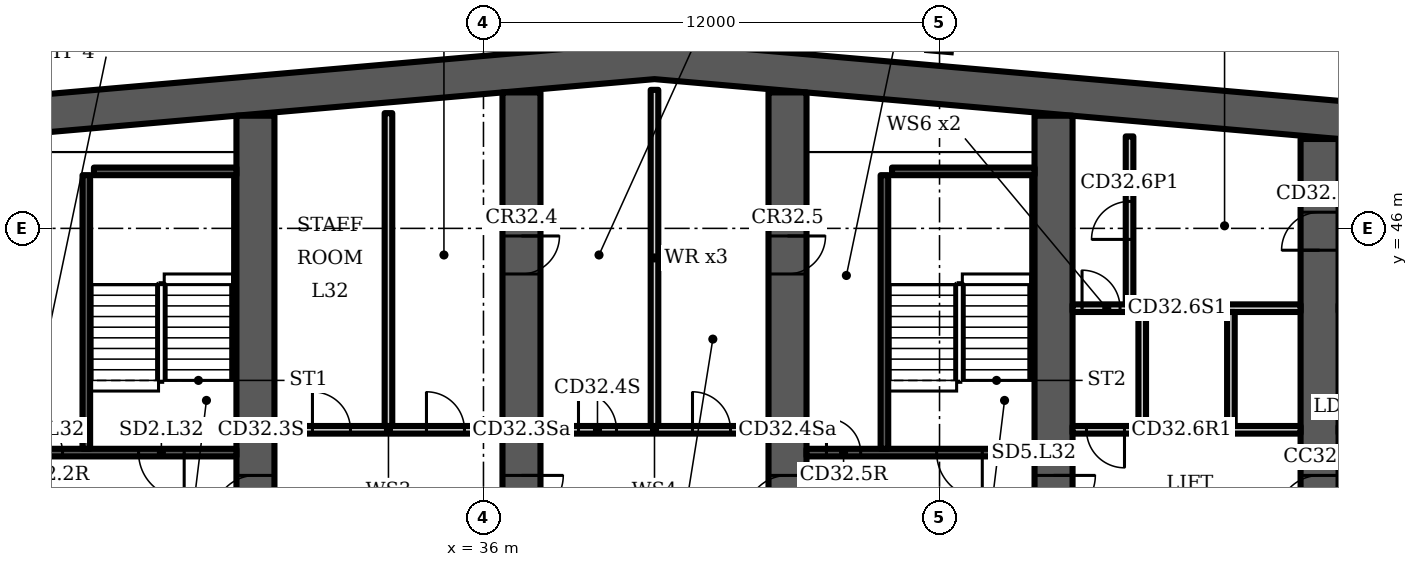
"""IFC4 building model, lengths in metres.
Left out: names, types, materials, properties, quantities, classifications, styles, units other than length and angle.
Written with IfcOpenShell. Run it as: python <this file> out.ifc"""

import sys

from ifc_helpers import new_model, si_unit, direction, frame, frame_2d, origin, origin_2d, place, context, subcontext, project, spatial, polyline, rectangle, i_section, outline, extrude, element, fill, save


model = new_model("IFC4")
c1 = context("Model", 3, precision=1e-05, world=origin(), true_north=direction((0.0, 1.0)))
c2 = subcontext(c1, "Body", "Model", "MODEL_VIEW")
j1 = project(units=[si_unit("LENGTHUNIT", "METRE"), si_unit("PLANEANGLEUNIT", "RADIAN")], contexts=[c1])
p1 = place(None, origin())
s1 = spatial("IfcSite", under=j1, at=p1, CompositionType="ELEMENT")
p2 = place(p1, origin())
s2 = spatial("IfcBuilding", under=s1, at=p2, CompositionType="ELEMENT")
p3 = place(p2, frame((0.0, 0.0, 136.3)))
s3 = spatial("IfcBuildingStorey", under=s2, at=p3, CompositionType="ELEMENT", Elevation=136.3)
p4 = place(p3, frame((0.0, 0.0, -0.0)))
e1 = element("IfcWall", 1, at=p4, inside=s3, PredefinedType="SHEAR", context=c2, shape_type="SweptSolid", body=[
    extrude(outline(polyline([(16.0, 47.784), (40.5, 49.927), (65.0, 47.784), (65.0, 48.787), (40.5, 50.931), (16.0, 48.787), (16.0, 47.784)])), origin(), (0.0, 0.0, 1.0), 3.6),
])
p5 = place(p3, frame((30.0, 35.0, 0.0), z_axis=(0.0, 0.0, 1.0), x_axis=(0.0, 1.0, 0.0)))
e2 = element("IfcWall", 2, at=p5, inside=s3, PredefinedType="SHEAR", context=c2, shape_type="SweptSolid", body=[
    extrude(rectangle(XDim=13.965, YDim=1.0, at=frame_2d((6.982, 0.0))), origin(), (0.0, 0.0, 1.0), 3.6),
])
p6 = place(p5, frame((3.4, 0.0, 0.0)))
e3 = element("IfcOpeningElement", 3, at=p6, cuts=e2, PredefinedType="OPENING", context=c2, shape_type="SweptSolid", body=[
    extrude(rectangle(XDim=1.1, YDim=2.1, at=frame_2d((0.55, 1.05))), frame((0.0, 0.51, 0.0), z_axis=(0.0, -1.0, 0.0), x_axis=(1.0, 0.0, 0.0)), (0.0, 0.0, 1.0), 1.02),
])
p7 = place(p3, frame((37.0, 35.0, 0.0), z_axis=(0.0, 0.0, 1.0), x_axis=(0.0, 1.0, 0.0)))
e4 = element("IfcWall", 4, at=p7, inside=s3, PredefinedType="SHEAR", context=c2, shape_type="SweptSolid", body=[
    extrude(rectangle(XDim=14.577, YDim=1.0, at=frame_2d((7.289, 0.0))), origin(), (0.0, 0.0, 1.0), 3.6),
])
p8 = place(p7, frame((3.4, 0.0, 0.0)))
e5 = element("IfcOpeningElement", 5, at=p8, cuts=e4, PredefinedType="OPENING", context=c2, shape_type="SweptSolid", body=[
    extrude(rectangle(XDim=1.1, YDim=2.1, at=frame_2d((0.55, 1.05))), frame((0.0, 0.51, 0.0), z_axis=(0.0, -1.0, 0.0), x_axis=(1.0, 0.0, 0.0)), (0.0, 0.0, 1.0), 1.02),
])
p9 = place(p7, frame((9.8, 0.0, 0.0)))
e6 = element("IfcOpeningElement", 6, at=p9, cuts=e4, PredefinedType="OPENING", context=c2, shape_type="SweptSolid", body=[
    extrude(rectangle(XDim=1.0, YDim=2.1, at=frame_2d((0.5, 1.05))), frame((0.0, 0.51, 0.0), z_axis=(0.0, -1.0, 0.0), x_axis=(1.0, 0.0, 0.0)), (0.0, 0.0, 1.0), 1.02),
])
p10 = place(p3, frame((44.0, 35.0, 0.0), z_axis=(0.0, 0.0, 1.0), x_axis=(0.0, 1.0, 0.0)))
e7 = element("IfcWall", 7, at=p10, inside=s3, PredefinedType="SHEAR", context=c2, shape_type="SweptSolid", body=[
    extrude(rectangle(XDim=14.577, YDim=1.0, at=frame_2d((7.289, 0.0))), origin(), (0.0, 0.0, 1.0), 3.6),
])
p11 = place(p10, frame((3.4, 0.0, 0.0)))
e8 = element("IfcOpeningElement", 8, at=p11, cuts=e7, PredefinedType="OPENING", context=c2, shape_type="SweptSolid", body=[
    extrude(rectangle(XDim=1.1, YDim=2.1, at=frame_2d((0.55, 1.05))), frame((0.0, 0.51, 0.0), z_axis=(0.0, -1.0, 0.0), x_axis=(1.0, 0.0, 0.0)), (0.0, 0.0, 1.0), 1.02),
])
p12 = place(p10, frame((9.8, 0.0, 0.0)))
e9 = element("IfcOpeningElement", 9, at=p12, cuts=e7, PredefinedType="OPENING", context=c2, shape_type="SweptSolid", body=[
    extrude(rectangle(XDim=1.0, YDim=2.1, at=frame_2d((0.5, 1.05))), frame((0.0, 0.51, 0.0), z_axis=(0.0, -1.0, 0.0), x_axis=(1.0, 0.0, 0.0)), (0.0, 0.0, 1.0), 1.02),
])
p13 = place(p3, frame((51.0, 35.0, 0.0), z_axis=(0.0, 0.0, 1.0), x_axis=(0.0, 1.0, 0.0)))
e10 = element("IfcWall", 10, at=p13, inside=s3, PredefinedType="SHEAR", context=c2, shape_type="SweptSolid", body=[
    extrude(rectangle(XDim=13.965, YDim=1.0, at=frame_2d((6.982, 0.0))), origin(), (0.0, 0.0, 1.0), 3.6),
])
p14 = place(p13, frame((3.4, 0.0, 0.0)))
e11 = element("IfcOpeningElement", 11, at=p14, cuts=e10, PredefinedType="OPENING", context=c2, shape_type="SweptSolid", body=[
    extrude(rectangle(XDim=1.1, YDim=2.1, at=frame_2d((0.55, 1.05))), frame((0.0, 0.51, 0.0), z_axis=(0.0, -1.0, 0.0), x_axis=(1.0, 0.0, 0.0)), (0.0, 0.0, 1.0), 1.02),
])
p15 = place(p3, frame((58.0, 35.0, 0.0), z_axis=(0.0, 0.0, 1.0), x_axis=(0.0, 1.0, 0.0)))
e12 = element("IfcWall", 12, at=p15, inside=s3, PredefinedType="SHEAR", context=c2, shape_type="SweptSolid", body=[
    extrude(rectangle(XDim=13.352, YDim=1.0, at=frame_2d((6.676, 0.0))), origin(), (0.0, 0.0, 1.0), 3.6),
])
p16 = place(p15, frame((10.426, 0.0, 0.0)))
e13 = element("IfcOpeningElement", 13, at=p16, cuts=e12, PredefinedType="OPENING", context=c2, shape_type="SweptSolid", body=[
    extrude(rectangle(XDim=1.0, YDim=2.1, at=frame_2d((0.5, 1.05))), frame((0.0, 0.51, 0.0), z_axis=(0.0, -1.0, 0.0), x_axis=(1.0, 0.0, 0.0)), (0.0, 0.0, 1.0), 1.02),
])
p17 = place(p15, frame((3.4, 0.0, 0.0)))
e14 = element("IfcOpeningElement", 14, at=p17, cuts=e12, PredefinedType="OPENING", context=c2, shape_type="SweptSolid", body=[
    extrude(rectangle(XDim=1.1, YDim=2.1, at=frame_2d((0.55, 1.05))), frame((0.0, 0.51, 0.0), z_axis=(0.0, -1.0, 0.0), x_axis=(1.0, 0.0, 0.0)), (0.0, 0.0, 1.0), 1.02),
])
p18 = place(p3, frame((48.0, 50.815, 0.0), z_axis=(0.0, 0.0, 1.0), x_axis=(0.087156, 0.996198, 0.0)))
e15 = element("IfcColumn", 15, at=p18, inside=s3, PredefinedType="COLUMN", context=c2, shape_type="SweptSolid", body=[
    extrude(i_section(OverallWidth=0.305, OverallDepth=0.62, WebThickness=0.021, FlangeThickness=0.04, FilletRadius=0.027, at=origin_2d()), origin(), (0.0, 0.0, 1.0), 3.6),
])
p19 = place(p3, frame((23.5, 40.1, 0.0), z_axis=(0.0, 0.0, 1.0), x_axis=(1.0, 0.0, 0.0)))
e16 = element("IfcWall", 16, at=p19, inside=s3, PredefinedType="SHEAR", context=c2, shape_type="SweptSolid", body=[
    extrude(rectangle(XDim=6.0, YDim=0.2, at=frame_2d((3.0, 0.0))), origin(), (0.0, 0.0, 1.0), 3.2),
])
p20 = place(p19, frame((3.425, 0.0, 0.0)))
e17 = element("IfcOpeningElement", 17, at=p20, cuts=e16, PredefinedType="OPENING", context=c2, shape_type="SweptSolid", body=[
    extrude(rectangle(XDim=1.2, YDim=2.1, at=frame_2d((0.6, 1.05))), frame((0.0, 0.11, 0.0), z_axis=(0.0, -1.0, 0.0), x_axis=(1.0, 0.0, 0.0)), (0.0, 0.0, 1.0), 0.22),
])
p21 = place(p19, frame((0.525, 0.0, 0.0)))
e18 = element("IfcOpeningElement", 18, at=p21, cuts=e16, PredefinedType="OPENING", context=c2, shape_type="SweptSolid", body=[
    extrude(rectangle(XDim=0.9, YDim=2.1, at=frame_2d((0.45, 1.05))), frame((0.0, 0.11, 0.0), z_axis=(0.0, -1.0, 0.0), x_axis=(1.0, 0.0, 0.0)), (0.0, 0.0, 1.0), 0.22),
])
p22 = place(p3, frame((25.55, 40.2, 0.0), z_axis=(0.0, 0.0, 1.0), x_axis=(0.0, 1.0, 0.0)))
e19 = element("IfcWall", 19, at=p22, inside=s3, PredefinedType="SHEAR", context=c2, shape_type="SweptSolid", body=[
    extrude(rectangle(XDim=7.2, YDim=0.2, at=frame_2d((3.6, 0.0))), origin(), (0.0, 0.0, 1.0), 3.2),
])
p23 = place(p3, frame((25.75, 47.5, 0.0), z_axis=(0.0, 0.0, 1.0), x_axis=(1.0, 0.0, 0.0)))
e20 = element("IfcWall", 20, at=p23, inside=s3, PredefinedType="SHEAR", context=c2, shape_type="SweptSolid", body=[
    extrude(rectangle(XDim=3.75, YDim=0.2, at=frame_2d((1.875, 0.0))), origin(), (0.0, 0.0, 1.0), 3.2),
])
p24 = place(p3, frame((30.5, 40.7, 0.0), z_axis=(0.0, 0.0, 1.0), x_axis=(1.0, 0.0, 0.0)))
e21 = element("IfcWall", 21, at=p24, inside=s3, PredefinedType="PARTITIONING", context=c2, shape_type="SweptSolid", body=[
    extrude(rectangle(XDim=6.0, YDim=0.2, at=frame_2d((3.0, 0.0))), origin(), (0.0, 0.0, 1.0), 3.2),
])
p25 = place(p24, frame((1.0, 0.0, 0.0)))
e22 = element("IfcOpeningElement", 22, at=p25, cuts=e21, PredefinedType="OPENING", context=c2, shape_type="SweptSolid", body=[
    extrude(rectangle(XDim=1.0, YDim=2.1, at=frame_2d((0.5, 1.05))), frame((0.0, 0.11, 0.0), z_axis=(0.0, -1.0, 0.0), x_axis=(1.0, 0.0, 0.0)), (0.0, 0.0, 1.0), 0.22),
])
p26 = place(p24, frame((4.0, 0.0, 0.0)))
e23 = element("IfcOpeningElement", 23, at=p26, cuts=e21, PredefinedType="OPENING", context=c2, shape_type="SweptSolid", body=[
    extrude(rectangle(XDim=1.0, YDim=2.1, at=frame_2d((0.5, 1.05))), frame((0.0, 0.11, 0.0), z_axis=(0.0, -1.0, 0.0), x_axis=(1.0, 0.0, 0.0)), (0.0, 0.0, 1.0), 0.22),
])
p27 = place(p3, frame((33.5, 40.8, 0.0), z_axis=(0.0, 0.0, 1.0), x_axis=(0.0, 1.0, 0.0)))
e24 = element("IfcWall", 24, at=p27, inside=s3, PredefinedType="PARTITIONING", context=c2, shape_type="SweptSolid", body=[
    extrude(rectangle(XDim=8.232, YDim=0.2, at=frame_2d((4.116, 0.0))), origin(), (0.0, 0.0, 1.0), 3.2),
])
p28 = place(p3, frame((37.5, 40.7, 0.0), z_axis=(0.0, 0.0, 1.0), x_axis=(1.0, 0.0, 0.0)))
e25 = element("IfcWall", 25, at=p28, inside=s3, PredefinedType="PARTITIONING", context=c2, shape_type="SweptSolid", body=[
    extrude(rectangle(XDim=6.0, YDim=0.2, at=frame_2d((3.0, 0.0))), origin(), (0.0, 0.0, 1.0), 3.2),
])
p29 = place(p28, frame((1.0, 0.0, 0.0)))
e26 = element("IfcOpeningElement", 26, at=p29, cuts=e25, PredefinedType="OPENING", context=c2, shape_type="SweptSolid", body=[
    extrude(rectangle(XDim=1.0, YDim=2.1, at=frame_2d((0.5, 1.05))), frame((0.0, 0.11, 0.0), z_axis=(0.0, -1.0, 0.0), x_axis=(1.0, 0.0, 0.0)), (0.0, 0.0, 1.0), 0.22),
])
p30 = place(p28, frame((4.0, 0.0, 0.0)))
e27 = element("IfcOpeningElement", 27, at=p30, cuts=e25, PredefinedType="OPENING", context=c2, shape_type="SweptSolid", body=[
    extrude(rectangle(XDim=1.0, YDim=2.1, at=frame_2d((0.5, 1.05))), frame((0.0, 0.11, 0.0), z_axis=(0.0, -1.0, 0.0), x_axis=(1.0, 0.0, 0.0)), (0.0, 0.0, 1.0), 0.22),
])
p31 = place(p3, frame((40.5, 40.8, 0.0), z_axis=(0.0, 0.0, 1.0), x_axis=(0.0, 1.0, 0.0)))
e28 = element("IfcWall", 28, at=p31, inside=s3, PredefinedType="PARTITIONING", context=c2, shape_type="SweptSolid", body=[
    extrude(rectangle(XDim=8.844, YDim=0.2, at=frame_2d((4.422, 0.0))), origin(), (0.0, 0.0, 1.0), 3.2),
])
p32 = place(p3, frame((44.5, 40.1, 0.0), z_axis=(0.0, 0.0, 1.0), x_axis=(1.0, 0.0, 0.0)))
e29 = element("IfcWall", 29, at=p32, inside=s3, PredefinedType="SHEAR", context=c2, shape_type="SweptSolid", body=[
    extrude(rectangle(XDim=6.0, YDim=0.2, at=frame_2d((3.0, 0.0))), origin(), (0.0, 0.0, 1.0), 3.2),
])
p33 = place(p32, frame((3.425, 0.0, 0.0)))
e30 = element("IfcOpeningElement", 30, at=p33, cuts=e29, PredefinedType="OPENING", context=c2, shape_type="SweptSolid", body=[
    extrude(rectangle(XDim=1.2, YDim=2.1, at=frame_2d((0.6, 1.05))), frame((0.0, 0.11, 0.0), z_axis=(0.0, -1.0, 0.0), x_axis=(1.0, 0.0, 0.0)), (0.0, 0.0, 1.0), 0.22),
])
p34 = place(p32, frame((0.525, 0.0, 0.0)))
e31 = element("IfcOpeningElement", 31, at=p34, cuts=e29, PredefinedType="OPENING", context=c2, shape_type="SweptSolid", body=[
    extrude(rectangle(XDim=0.9, YDim=2.1, at=frame_2d((0.45, 1.05))), frame((0.0, 0.11, 0.0), z_axis=(0.0, -1.0, 0.0), x_axis=(1.0, 0.0, 0.0)), (0.0, 0.0, 1.0), 0.22),
])
p35 = place(p3, frame((46.55, 40.2, 0.0), z_axis=(0.0, 0.0, 1.0), x_axis=(0.0, 1.0, 0.0)))
e32 = element("IfcWall", 32, at=p35, inside=s3, PredefinedType="SHEAR", context=c2, shape_type="SweptSolid", body=[
    extrude(rectangle(XDim=7.2, YDim=0.2, at=frame_2d((3.6, 0.0))), origin(), (0.0, 0.0, 1.0), 3.2),
])
p36 = place(p3, frame((46.75, 47.5, 0.0), z_axis=(0.0, 0.0, 1.0), x_axis=(1.0, 0.0, 0.0)))
e33 = element("IfcWall", 33, at=p36, inside=s3, PredefinedType="SHEAR", context=c2, shape_type="SweptSolid", body=[
    extrude(rectangle(XDim=3.75, YDim=0.2, at=frame_2d((1.875, 0.0))), origin(), (0.0, 0.0, 1.0), 3.2),
])
p37 = place(p3, frame((51.5, 40.7, 0.0), z_axis=(0.0, 0.0, 1.0), x_axis=(1.0, 0.0, 0.0)))
e34 = element("IfcWall", 34, at=p37, inside=s3, PredefinedType="PARTITIONING", context=c2, shape_type="SweptSolid", body=[
    extrude(rectangle(XDim=6.0, YDim=0.2, at=frame_2d((3.0, 0.0))), origin(), (0.0, 0.0, 1.0), 3.2),
])
p38 = place(p37, frame((0.367, 0.0, 0.0)))
e35 = element("IfcOpeningElement", 35, at=p38, cuts=e34, PredefinedType="OPENING", context=c2, shape_type="SweptSolid", body=[
    extrude(rectangle(XDim=1.0, YDim=2.1, at=frame_2d((0.5, 1.05))), frame((0.0, 0.11, 0.0), z_axis=(0.0, -1.0, 0.0), x_axis=(1.0, 0.0, 0.0)), (0.0, 0.0, 1.0), 0.22),
])
p39 = place(p3, frame((51.5, 43.9, 0.0), z_axis=(0.0, 0.0, 1.0), x_axis=(1.0, 0.0, 0.0)))
e36 = element("IfcWall", 36, at=p39, inside=s3, PredefinedType="PARTITIONING", context=c2, shape_type="SweptSolid", body=[
    extrude(rectangle(XDim=6.0, YDim=0.2, at=frame_2d((3.0, 0.0))), origin(), (0.0, 0.0, 1.0), 3.2),
])
p40 = place(p39, frame((0.25, 0.0, 0.0)))
e37 = element("IfcOpeningElement", 37, at=p40, cuts=e36, PredefinedType="OPENING", context=c2, shape_type="SweptSolid", body=[
    extrude(rectangle(XDim=1.0, YDim=2.1, at=frame_2d((0.5, 1.05))), frame((0.0, 0.11, 0.0), z_axis=(0.0, -1.0, 0.0), x_axis=(1.0, 0.0, 0.0)), (0.0, 0.0, 1.0), 0.22),
])
p41 = place(p3, frame((0.0, 0.0, -0.0)))
e38 = element("IfcWall", 38, at=p41, inside=s3, PredefinedType="PARTITIONING", context=c2, shape_type="SweptSolid", body=[
    extrude(outline(polyline([(53.233, 40.8), (53.233, 43.8), (53.433, 43.8), (53.433, 40.8), (53.233, 40.8)])), origin(), (0.0, 0.0, 1.0), 3.2),
])
p42 = place(p3, frame((0.0, 0.0, -0.0)))
e39 = element("IfcWall", 39, at=p42, inside=s3, PredefinedType="PARTITIONING", context=c2, shape_type="SweptSolid", body=[
    extrude(outline(polyline([(55.567, 40.8), (55.567, 43.8), (55.767, 43.8), (55.767, 40.8), (55.567, 40.8)])), origin(), (0.0, 0.0, 1.0), 3.2),
])
p43 = place(p3, frame((53.0, 44.0, 0.0), z_axis=(0.0, 0.0, 1.0), x_axis=(0.0, 1.0, 0.0)))
e40 = element("IfcWall", 40, at=p43, inside=s3, PredefinedType="PARTITIONING", context=c2, shape_type="SweptSolid", body=[
    extrude(rectangle(XDim=4.42, YDim=0.2, at=frame_2d((2.21, 0.0))), origin(), (0.0, 0.0, 1.0), 3.2),
])
p44 = place(p43, frame((1.71, 0.0, 0.0)))
e41 = element("IfcOpeningElement", 41, at=p44, cuts=e40, PredefinedType="OPENING", context=c2, shape_type="SweptSolid", body=[
    extrude(rectangle(XDim=1.0, YDim=2.1, at=frame_2d((0.5, 1.05))), frame((0.0, 0.11, 0.0), z_axis=(0.0, -1.0, 0.0), x_axis=(1.0, 0.0, 0.0)), (0.0, 0.0, 1.0), 0.22),
])
p45 = place(p20, origin())
e42 = element("IfcDoor", 42, at=p45, inside=s3, OperationType="SINGLE_SWING_RIGHT", PredefinedType="DOOR", context=c2, shape_type="SweptSolid", body=[
    extrude(rectangle(XDim=1.2, YDim=2.1, at=frame_2d((0.6, 1.05))), frame((0.0, 0.025, 0.0), z_axis=(0.0, -1.0, 0.0), x_axis=(1.0, 0.0, 0.0)), (0.0, 0.0, 1.0), 0.05),
])
fill(e17, e42)
p46 = place(p21, origin())
e43 = element("IfcDoor", 43, at=p46, inside=s3, OperationType="SINGLE_SWING_LEFT", PredefinedType="DOOR", context=c2, shape_type="SweptSolid", body=[
    extrude(rectangle(XDim=0.9, YDim=2.1, at=frame_2d((0.45, 1.05))), frame((0.0, 0.025, 0.0), z_axis=(0.0, -1.0, 0.0), x_axis=(1.0, 0.0, 0.0)), (0.0, 0.0, 1.0), 0.05),
])
fill(e18, e43)
p47 = place(p25, origin())
e44 = element("IfcDoor", 44, at=p47, inside=s3, OperationType="SINGLE_SWING_LEFT", PredefinedType="DOOR", context=c2, shape_type="SweptSolid", body=[
    extrude(rectangle(XDim=1.0, YDim=2.1, at=frame_2d((0.5, 1.05))), frame((0.0, 0.025, 0.0), z_axis=(0.0, -1.0, 0.0), x_axis=(1.0, 0.0, 0.0)), (0.0, 0.0, 1.0), 0.05),
])
fill(e22, e44)
p48 = place(p26, origin())
e45 = element("IfcDoor", 45, at=p48, inside=s3, OperationType="SINGLE_SWING_LEFT", PredefinedType="DOOR", context=c2, shape_type="SweptSolid", body=[
    extrude(rectangle(XDim=1.0, YDim=2.1, at=frame_2d((0.5, 1.05))), frame((0.0, 0.025, 0.0), z_axis=(0.0, -1.0, 0.0), x_axis=(1.0, 0.0, 0.0)), (0.0, 0.0, 1.0), 0.05),
])
fill(e23, e45)
p49 = place(p29, origin())
e46 = element("IfcDoor", 46, at=p49, inside=s3, OperationType="SINGLE_SWING_LEFT", PredefinedType="DOOR", context=c2, shape_type="SweptSolid", body=[
    extrude(rectangle(XDim=1.0, YDim=2.1, at=frame_2d((0.5, 1.05))), frame((0.0, 0.025, 0.0), z_axis=(0.0, -1.0, 0.0), x_axis=(1.0, 0.0, 0.0)), (0.0, 0.0, 1.0), 0.05),
])
fill(e26, e46)
p50 = place(p30, origin())
e47 = element("IfcDoor", 47, at=p50, inside=s3, OperationType="SINGLE_SWING_LEFT", PredefinedType="DOOR", context=c2, shape_type="SweptSolid", body=[
    extrude(rectangle(XDim=1.0, YDim=2.1, at=frame_2d((0.5, 1.05))), frame((0.0, 0.025, 0.0), z_axis=(0.0, -1.0, 0.0), x_axis=(1.0, 0.0, 0.0)), (0.0, 0.0, 1.0), 0.05),
])
fill(e27, e47)
p51 = place(p33, origin())
e48 = element("IfcDoor", 48, at=p51, inside=s3, OperationType="SINGLE_SWING_RIGHT", PredefinedType="DOOR", context=c2, shape_type="SweptSolid", body=[
    extrude(rectangle(XDim=1.2, YDim=2.1, at=frame_2d((0.6, 1.05))), frame((0.0, 0.025, 0.0), z_axis=(0.0, -1.0, 0.0), x_axis=(1.0, 0.0, 0.0)), (0.0, 0.0, 1.0), 0.05),
])
fill(e30, e48)
p52 = place(p34, origin())
e49 = element("IfcDoor", 49, at=p52, inside=s3, OperationType="SINGLE_SWING_LEFT", PredefinedType="DOOR", context=c2, shape_type="SweptSolid", body=[
    extrude(rectangle(XDim=0.9, YDim=2.1, at=frame_2d((0.45, 1.05))), frame((0.0, 0.025, 0.0), z_axis=(0.0, -1.0, 0.0), x_axis=(1.0, 0.0, 0.0)), (0.0, 0.0, 1.0), 0.05),
])
fill(e31, e49)
p53 = place(p38, origin())
e50 = element("IfcDoor", 50, at=p53, inside=s3, OperationType="SINGLE_SWING_RIGHT", PredefinedType="DOOR", context=c2, shape_type="SweptSolid", body=[
    extrude(rectangle(XDim=1.0, YDim=2.1, at=frame_2d((0.5, 1.05))), frame((0.0, 0.025, 0.0), z_axis=(0.0, -1.0, 0.0), x_axis=(1.0, 0.0, 0.0)), (0.0, 0.0, 1.0), 0.05),
])
fill(e35, e50)
p54 = place(p40, origin())
e51 = element("IfcDoor", 51, at=p54, inside=s3, OperationType="SINGLE_SWING_LEFT", PredefinedType="DOOR", context=c2, shape_type="SweptSolid", body=[
    extrude(rectangle(XDim=1.0, YDim=2.1, at=frame_2d((0.5, 1.05))), frame((0.0, 0.025, 0.0), z_axis=(0.0, -1.0, 0.0), x_axis=(1.0, 0.0, 0.0)), (0.0, 0.0, 1.0), 0.05),
])
fill(e37, e51)
p55 = place(p44, origin())
e52 = element("IfcDoor", 52, at=p55, inside=s3, OperationType="SINGLE_SWING_LEFT", PredefinedType="DOOR", context=c2, shape_type="SweptSolid", body=[
    extrude(rectangle(XDim=1.0, YDim=2.1, at=frame_2d((0.5, 1.05))), frame((0.0, 0.025, 0.0), z_axis=(0.0, -1.0, 0.0), x_axis=(1.0, 0.0, 0.0)), (0.0, 0.0, 1.0), 0.05),
])
fill(e41, e52)
p56 = place(p16, origin())
e53 = element("IfcDoor", 53, at=p56, inside=s3, OperationType="SINGLE_SWING_LEFT", PredefinedType="DOOR", context=c2, shape_type="SweptSolid", body=[
    extrude(rectangle(XDim=1.0, YDim=2.1, at=frame_2d((0.5, 1.05))), frame((0.0, 0.5, 0.0), z_axis=(0.0, -1.0, 0.0), x_axis=(1.0, 0.0, 0.0)), (0.0, 0.0, 1.0), 1.0),
])
fill(e13, e53)
p57 = place(p6, origin())
e54 = element("IfcDoor", 54, at=p57, inside=s3, OperationType="SINGLE_SWING_LEFT", PredefinedType="DOOR", context=c2, shape_type="SweptSolid", body=[
    extrude(rectangle(XDim=1.1, YDim=2.1, at=frame_2d((0.55, 1.05))), frame((0.0, 0.025, 0.0), z_axis=(0.0, -1.0, 0.0), x_axis=(1.0, 0.0, 0.0)), (0.0, 0.0, 1.0), 0.05),
])
fill(e3, e54)
p58 = place(p8, origin())
e55 = element("IfcDoor", 55, at=p58, inside=s3, OperationType="SINGLE_SWING_RIGHT", PredefinedType="DOOR", context=c2, shape_type="SweptSolid", body=[
    extrude(rectangle(XDim=1.1, YDim=2.1, at=frame_2d((0.55, 1.05))), frame((0.0, 0.025, 0.0), z_axis=(0.0, -1.0, 0.0), x_axis=(1.0, 0.0, 0.0)), (0.0, 0.0, 1.0), 0.05),
])
fill(e5, e55)
p59 = place(p9, origin())
e56 = element("IfcDoor", 56, at=p59, inside=s3, OperationType="SINGLE_SWING_RIGHT", PredefinedType="DOOR", context=c2, shape_type="SweptSolid", body=[
    extrude(rectangle(XDim=1.0, YDim=2.1, at=frame_2d((0.5, 1.05))), frame((0.0, 0.5, 0.0), z_axis=(0.0, -1.0, 0.0), x_axis=(1.0, 0.0, 0.0)), (0.0, 0.0, 1.0), 1.0),
])
fill(e6, e56)
p60 = place(p11, origin())
e57 = element("IfcDoor", 57, at=p60, inside=s3, OperationType="SINGLE_SWING_LEFT", PredefinedType="DOOR", context=c2, shape_type="SweptSolid", body=[
    extrude(rectangle(XDim=1.1, YDim=2.1, at=frame_2d((0.55, 1.05))), frame((0.0, 0.025, 0.0), z_axis=(0.0, -1.0, 0.0), x_axis=(1.0, 0.0, 0.0)), (0.0, 0.0, 1.0), 0.05),
])
fill(e8, e57)
p61 = place(p12, origin())
e58 = element("IfcDoor", 58, at=p61, inside=s3, OperationType="SINGLE_SWING_RIGHT", PredefinedType="DOOR", context=c2, shape_type="SweptSolid", body=[
    extrude(rectangle(XDim=1.0, YDim=2.1, at=frame_2d((0.5, 1.05))), frame((0.0, 0.5, 0.0), z_axis=(0.0, -1.0, 0.0), x_axis=(1.0, 0.0, 0.0)), (0.0, 0.0, 1.0), 1.0),
])
fill(e9, e58)
p62 = place(p14, origin())
e59 = element("IfcDoor", 59, at=p62, inside=s3, OperationType="SINGLE_SWING_RIGHT", PredefinedType="DOOR", context=c2, shape_type="SweptSolid", body=[
    extrude(rectangle(XDim=1.1, YDim=2.1, at=frame_2d((0.55, 1.05))), frame((0.0, 0.025, 0.0), z_axis=(0.0, -1.0, 0.0), x_axis=(1.0, 0.0, 0.0)), (0.0, 0.0, 1.0), 0.05),
])
fill(e11, e59)
p63 = place(p17, origin())
e60 = element("IfcDoor", 60, at=p63, inside=s3, OperationType="SINGLE_SWING_LEFT", PredefinedType="DOOR", context=c2, shape_type="SweptSolid", body=[
    extrude(rectangle(XDim=1.1, YDim=2.1, at=frame_2d((0.55, 1.05))), frame((0.0, 0.025, 0.0), z_axis=(0.0, -1.0, 0.0), x_axis=(1.0, 0.0, 0.0)), (0.0, 0.0, 1.0), 0.05),
])
fill(e14, e60)
save(model, sys.argv[1])
